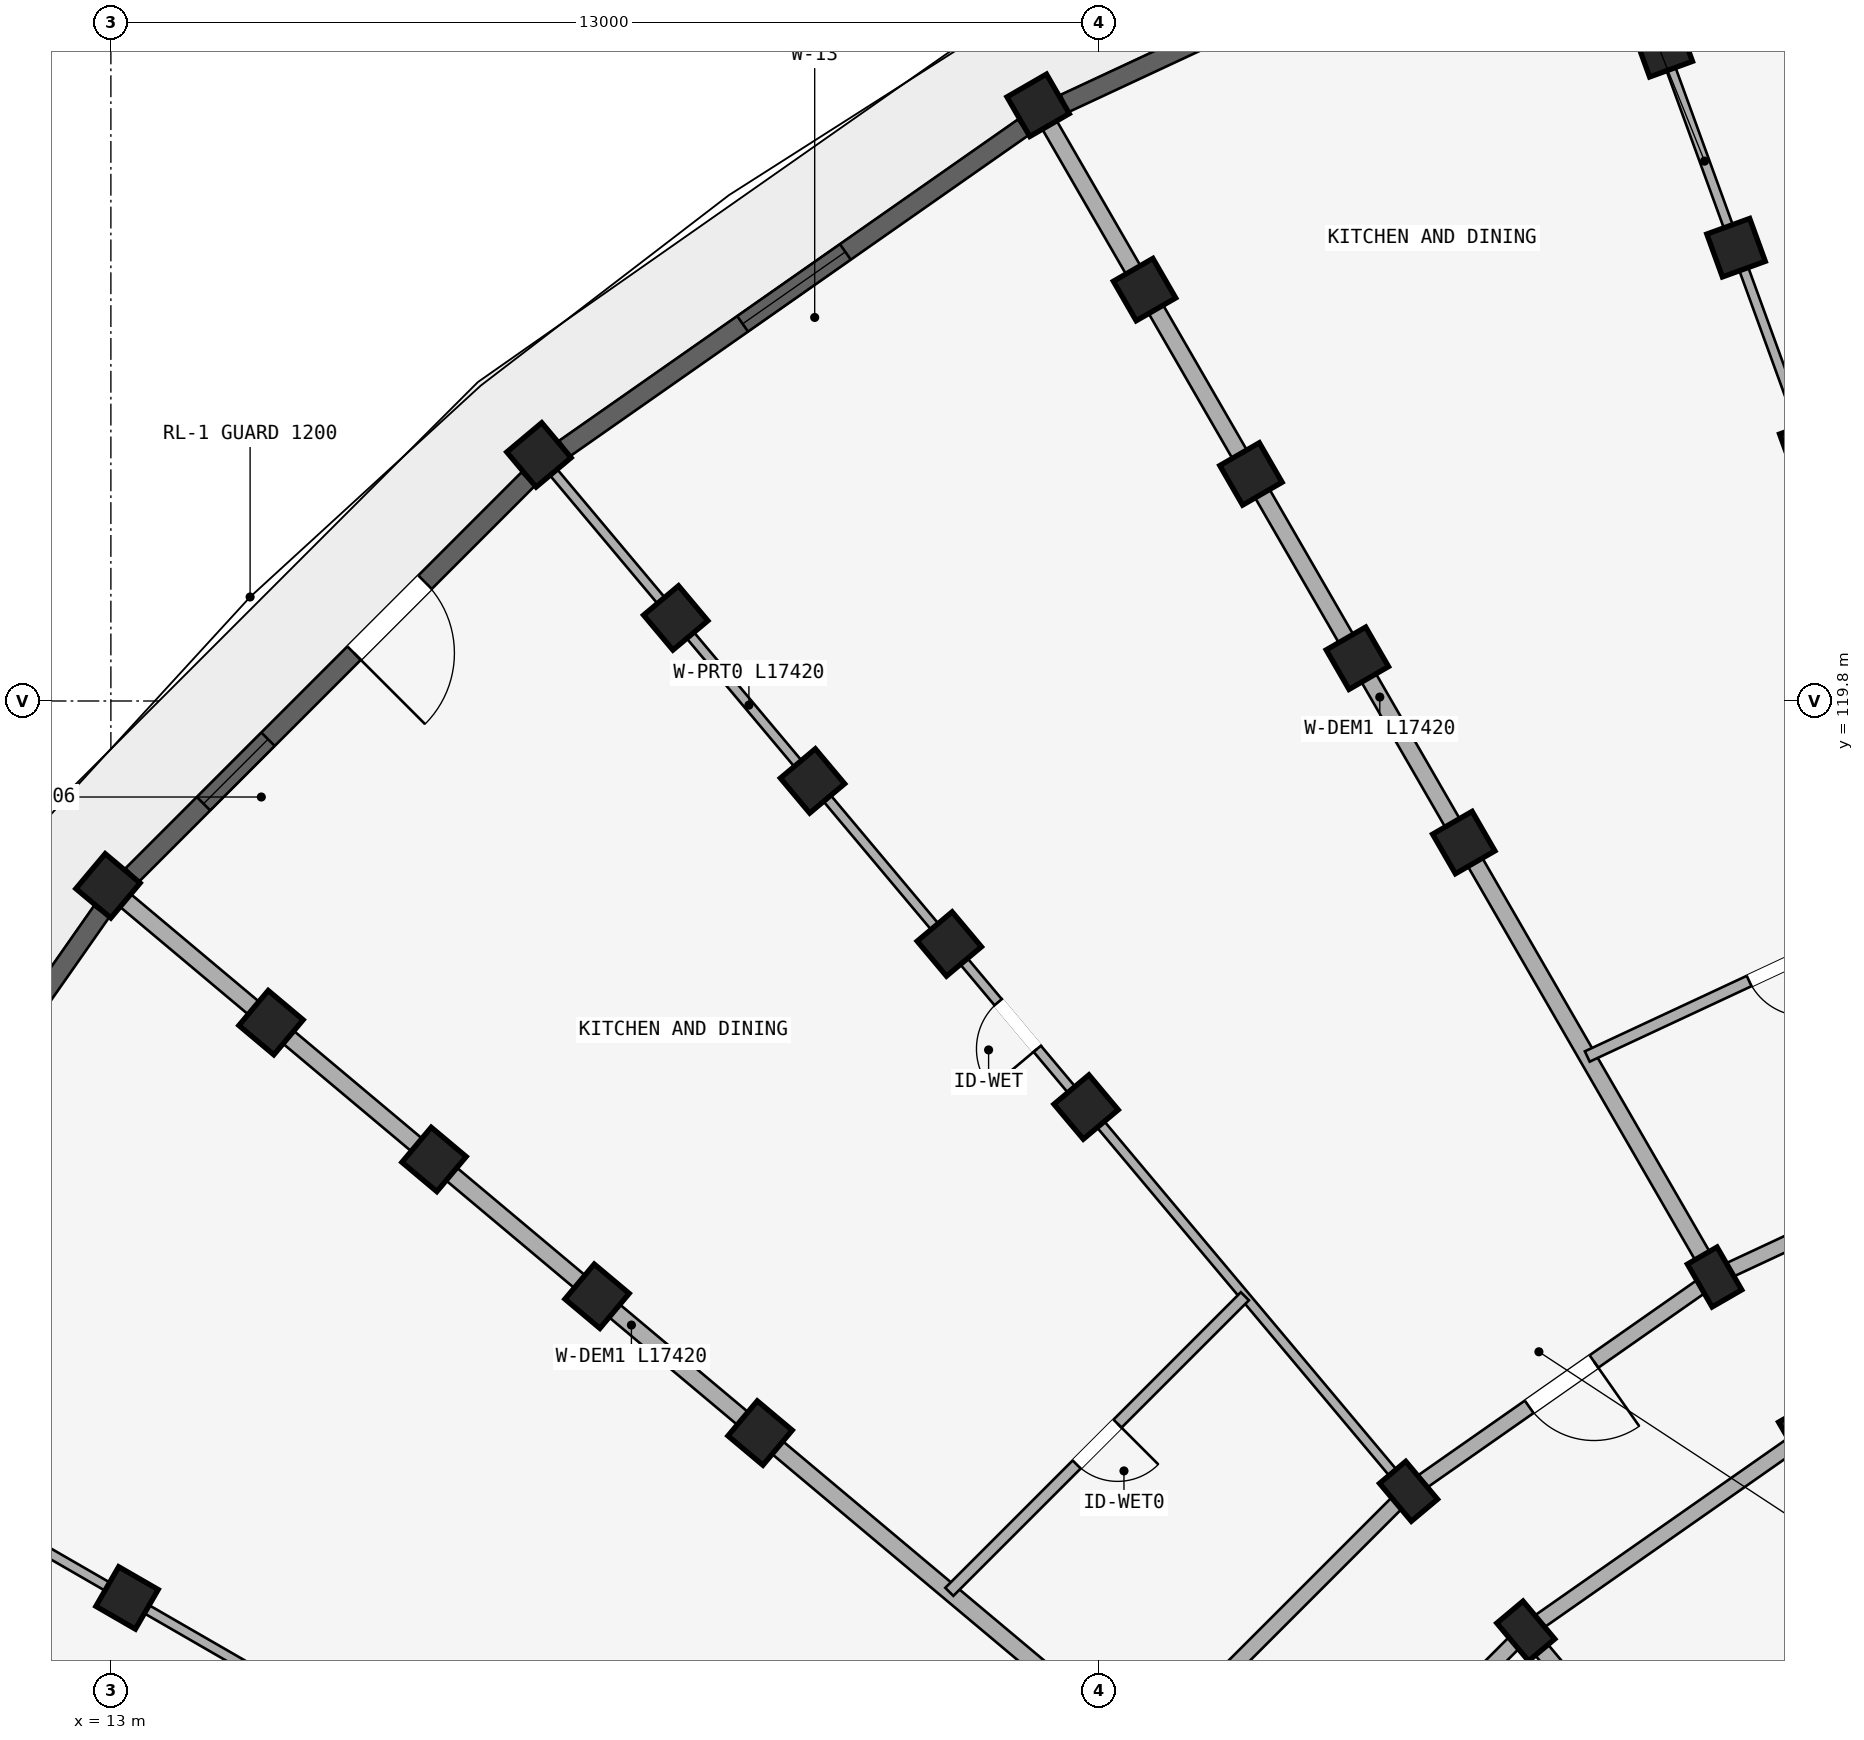
"""IFC4 building model, lengths in metres.
Left out: names, types, materials, properties, quantities, classifications, styles, units other than length and angle.
Written with IfcOpenShell. Run it as: python <this file> out.ifc"""

import sys

from ifc_helpers import new_model, si_unit, direction, frame, frame_2d, origin, origin_2d, place, context, subcontext, project, spatial, rectangle, extrude, element, fill, save


model = new_model("IFC4")
c1 = context("Model", 3, precision=1e-05, world=origin(), true_north=direction((0.0, 1.0)))
c2 = subcontext(c1, "Body", "Model", "MODEL_VIEW")
j1 = project(units=[si_unit("LENGTHUNIT", "METRE"), si_unit("PLANEANGLEUNIT", "RADIAN")], contexts=[c1])
p1 = place(None, origin())
s1 = spatial("IfcSite", under=j1, at=p1, CompositionType="ELEMENT")
p2 = place(p1, origin())
s2 = spatial("IfcBuilding", under=s1, at=p2, CompositionType="ELEMENT")
p3 = place(p2, frame((0.0, 0.0, 33.9)))
s3 = spatial("IfcBuildingStorey", under=s2, at=p3, CompositionType="ELEMENT", Elevation=33.9)
for number, where, z_axis, x_axis in (
    (1, (35.34, 123.132, 0.0), (0.0, 0.0, 1.0), (0.94, 0.342, 0.0)),
    (2, (34.382, 125.764, 0.0), (0.0, 0.0, 1.0), (0.94, 0.342, 0.0)),
    (3, (33.425, 128.395, 0.0), (0.0, 0.0, 1.0), (0.94, 0.342, 0.0)),
):
    element("IfcColumn", number, at=place(p3, frame(where, z_axis=z_axis, x_axis=x_axis)), inside=s3, PredefinedType="COLUMN", context=c2, shape_type="SweptSolid", body=[
        extrude(rectangle(XDim=0.6, YDim=0.6, at=origin_2d()), origin(), (0.0, 0.0, 1.0), 2.93),
    ])
for number, where, z_axis, x_axis in (
    (4, (35.3, 110.144, 0.0), (0.0, 0.0, 1.0), (0.866, 0.5, 0.0)),
    (5, (34.1, 112.222, 0.0), (0.0, 0.0, 1.0), (0.866, 0.5, 0.0)),
):
    element("IfcColumn", number, at=place(p3, frame(where, z_axis=z_axis, x_axis=x_axis)), inside=s3, PredefinedType="COLUMN", context=c2, shape_type="SweptSolid", body=[
        extrude(rectangle(XDim=0.45, YDim=0.65, at=origin_2d()), origin(), (0.0, 0.0, 1.0), 2.93),
    ])
for number, where, z_axis, x_axis in (
    (6, (30.8, 117.938, 0.0), (0.0, 0.0, 1.0), (0.866, 0.5, 0.0)),
    (7, (29.4, 120.363, 0.0), (0.0, 0.0, 1.0), (0.866, 0.5, 0.0)),
    (8, (28.0, 122.787, 0.0), (0.0, 0.0, 1.0), (0.866, 0.5, 0.0)),
    (9, (26.6, 125.212, 0.0), (0.0, 0.0, 1.0), (0.866, 0.5, 0.0)),
    (10, (25.2, 127.637, 0.0), (0.0, 0.0, 1.0), (0.866, 0.5, 0.0)),
):
    element("IfcColumn", number, at=place(p3, frame(where, z_axis=z_axis, x_axis=x_axis)), inside=s3, PredefinedType="COLUMN", context=c2, shape_type="SweptSolid", body=[
        extrude(rectangle(XDim=0.6, YDim=0.6, at=origin_2d()), origin(), (0.0, 0.0, 1.0), 2.93),
    ])
for number, where, z_axis, x_axis in (
    (11, (31.616, 107.564, 0.0), (0.0, 0.0, 1.0), (0.766, 0.643, 0.0)),
    (12, (30.073, 109.402, 0.0), (0.0, 0.0, 1.0), (0.766, 0.643, 0.0)),
):
    element("IfcColumn", number, at=place(p3, frame(where, z_axis=z_axis, x_axis=x_axis)), inside=s3, PredefinedType="COLUMN", context=c2, shape_type="SweptSolid", body=[
        extrude(rectangle(XDim=0.45, YDim=0.65, at=origin_2d()), origin(), (0.0, 0.0, 1.0), 2.93),
    ])
for number, where, z_axis, x_axis in (
    (13, (25.831, 114.458, 0.0), (0.0, 0.0, 1.0), (0.766, 0.643, 0.0)),
    (14, (24.031, 116.603, 0.0), (0.0, 0.0, 1.0), (0.766, 0.643, 0.0)),
    (15, (22.231, 118.748, 0.0), (0.0, 0.0, 1.0), (0.766, 0.643, 0.0)),
    (16, (20.432, 120.893, 0.0), (0.0, 0.0, 1.0), (0.766, 0.643, 0.0)),
    (17, (18.632, 123.038, 0.0), (0.0, 0.0, 1.0), (0.766, 0.643, 0.0)),
    (18, (21.542, 110.169, 0.0), (0.0, 0.0, 1.0), (0.643, 0.766, 0.0)),
    (19, (19.397, 111.969, 0.0), (0.0, 0.0, 1.0), (0.643, 0.766, 0.0)),
    (20, (17.252, 113.769, 0.0), (0.0, 0.0, 1.0), (0.643, 0.766, 0.0)),
    (21, (15.107, 115.568, 0.0), (0.0, 0.0, 1.0), (0.643, 0.766, 0.0)),
    (22, (12.962, 117.368, 0.0), (0.0, 0.0, 1.0), (0.643, 0.766, 0.0)),
    (23, (13.213, 108.0, 0.0), (0.0, 0.0, 1.0), (0.5, 0.866, 0.0)),
):
    element("IfcColumn", number, at=place(p3, frame(where, z_axis=z_axis, x_axis=x_axis)), inside=s3, PredefinedType="COLUMN", context=c2, shape_type="SweptSolid", body=[
        extrude(rectangle(XDim=0.6, YDim=0.6, at=origin_2d()), origin(), (0.0, 0.0, 1.0), 2.93),
    ])
p4 = place(p3, frame((38.555, 114.299, 0.0), z_axis=(0.0, 0.0, 1.0), x_axis=(-0.906302381024, -0.422629854778, 0.0)))
e24 = element("IfcWall", 24, at=p4, inside=s3, PredefinedType="STANDARD", context=c2, shape_type="SweptSolid", body=[
    extrude(rectangle(XDim=4.915, YDim=0.2, at=frame_2d((2.458, 0.0))), origin(), (0.0, 0.0, 1.0), 2.372),
])
p5 = place(p3, frame((35.3, 110.144, 0.0), z_axis=(0.0, 0.0, 1.0), x_axis=(-0.819155404658, -0.573571637217, 0.0)))
e25 = element("IfcWall", 25, at=p5, inside=s3, PredefinedType="STANDARD", context=c2, shape_type="SweptSolid", body=[
    extrude(rectangle(XDim=4.497, YDim=0.2, at=frame_2d((2.249, 0.0))), origin(), (0.0, 0.0, 1.0), 2.372),
])
p6 = place(p3, frame((34.1, 112.222, 0.0), z_axis=(0.0, 0.0, 1.0), x_axis=(-0.819140911474, -0.573592335331, 0.0)))
e26 = element("IfcWall", 26, at=p6, inside=s3, PredefinedType="STANDARD", context=c2, shape_type="SweptSolid", body=[
    extrude(rectangle(XDim=4.916, YDim=0.2, at=frame_2d((2.458, 0.0))), origin(), (0.0, 0.0, 1.0), 2.372),
])
p7 = place(p6, frame((1.938, 0.0, 0.0)))
e27 = element("IfcOpeningElement", 27, at=p7, cuts=e26, PredefinedType="OPENING", context=c2, shape_type="SweptSolid", body=[
    extrude(rectangle(XDim=1.04, YDim=2.15, at=frame_2d((0.52, 1.075))), frame((0.0, 0.11, 0.0), z_axis=(0.0, -1.0, 0.0), x_axis=(1.0, 0.0, 0.0)), (0.0, 0.0, 1.0), 0.22),
])
p8 = place(p3, frame((31.616, 107.564, 0.0), z_axis=(0.0, 0.0, 1.0), x_axis=(-0.707106781187, -0.707106781187, 0.0)))
e28 = element("IfcWall", 28, at=p8, inside=s3, PredefinedType="STANDARD", context=c2, shape_type="SweptSolid", body=[
    extrude(rectangle(XDim=4.497, YDim=0.2, at=frame_2d((2.249, 0.0))), origin(), (0.0, 0.0, 1.0), 2.372),
])
p9 = place(p8, frame((1.749, 0.0, 0.0)))
e29 = element("IfcOpeningElement", 29, at=p9, cuts=e28, PredefinedType="OPENING", context=c2, shape_type="SweptSolid", body=[
    extrude(rectangle(XDim=1.0, YDim=2.15, at=frame_2d((0.5, 1.075))), frame((0.0, 0.11, 0.0), z_axis=(0.0, -1.0, 0.0), x_axis=(1.0, 0.0, 0.0)), (0.0, 0.0, 1.0), 0.22),
])
p10 = place(p3, frame((30.073, 109.402, 0.0), z_axis=(0.0, 0.0, 1.0), x_axis=(-0.707106781187, -0.707106781187, 0.0)))
e30 = element("IfcWall", 30, at=p10, inside=s3, PredefinedType="STANDARD", context=c2, shape_type="SweptSolid", body=[
    extrude(rectangle(XDim=4.916, YDim=0.2, at=frame_2d((2.458, 0.0))), origin(), (0.0, 0.0, 1.0), 2.372),
])
p11 = place(p3, frame((38.521, 114.393, 0.0), z_axis=(0.0, 0.0, 1.0), x_axis=(-0.342022120477, 0.939691901159, 0.0)))
e31 = element("IfcWall", 31, at=p11, inside=s3, PredefinedType="PARTITIONING", context=c2, shape_type="SweptSolid", body=[
    extrude(rectangle(XDim=17.42, YDim=0.125, at=frame_2d((8.71, 0.0))), origin(), (0.0, 0.0, 1.0), 2.372),
])
p12 = place(p11, frame((7.5, 0.0, 0.0)))
e32 = element("IfcOpeningElement", 32, at=p12, cuts=e31, PredefinedType="OPENING", context=c2, shape_type="SweptSolid", body=[
    extrude(rectangle(XDim=0.8, YDim=2.1, at=frame_2d((0.4, 1.05))), frame((0.0, 0.073, 0.0), z_axis=(0.0, -1.0, 0.0), x_axis=(1.0, 0.0, 0.0)), (0.0, 0.0, 1.0), 0.145),
])
p13 = place(p3, frame((34.05, 112.309, 0.0), z_axis=(0.0, 0.0, 1.0), x_axis=(-0.499997843263, 0.866026648973, 0.0)))
e33 = element("IfcWall", 33, at=p13, inside=s3, PredefinedType="STANDARD", context=c2, shape_type="SweptSolid", body=[
    extrude(rectangle(XDim=17.42, YDim=0.22, at=frame_2d((8.71, 0.0))), origin(), (0.0, 0.0, 1.0), 2.372),
])
p14 = place(p3, frame((35.987, 102.355, 0.0), z_axis=(0.0, 0.0, 1.0), x_axis=(-0.642784846501, 0.766046761698, 0.0)))
e34 = element("IfcWall", 34, at=p14, inside=s3, PredefinedType="STANDARD", context=c2, shape_type="SweptSolid", body=[
    extrude(rectangle(XDim=6.75, YDim=0.22, at=frame_2d((3.375, 0.0))), origin(), (0.0, 0.0, 1.0), 2.372),
])
p15 = place(p3, frame((30.009, 109.479, 0.0), z_axis=(0.0, 0.0, 1.0), x_axis=(-0.642784757967, 0.766046835987, 0.0)))
e35 = element("IfcWall", 35, at=p15, inside=s3, PredefinedType="PARTITIONING", context=c2, shape_type="SweptSolid", body=[
    extrude(rectangle(XDim=17.42, YDim=0.125, at=frame_2d((8.71, 0.0))), origin(), (0.0, 0.0, 1.0), 2.372),
])
p16 = place(p15, frame((7.5, 0.0, 0.0)))
e36 = element("IfcOpeningElement", 36, at=p16, cuts=e35, PredefinedType="OPENING", context=c2, shape_type="SweptSolid", body=[
    extrude(rectangle(XDim=0.8, YDim=2.1, at=frame_2d((0.4, 1.05))), frame((0.0, 0.073, 0.0), z_axis=(0.0, -1.0, 0.0), x_axis=(1.0, 0.0, 0.0)), (0.0, 0.0, 1.0), 0.145),
])
p17 = place(p3, frame((26.521, 105.991, 0.0), z_axis=(0.0, 0.0, 1.0), x_axis=(-0.766046835987, 0.642784757967, 0.0)))
e37 = element("IfcWall", 37, at=p17, inside=s3, PredefinedType="STANDARD", context=c2, shape_type="SweptSolid", body=[
    extrude(rectangle(XDim=17.42, YDim=0.22, at=frame_2d((8.71, 0.0))), origin(), (0.0, 0.0, 1.0), 2.372),
])
p18 = place(p3, frame((23.691, 101.95, 0.0), z_axis=(0.0, 0.0, 1.0), x_axis=(-0.866026648973, 0.499997843263, 0.0)))
e38 = element("IfcWall", 38, at=p18, inside=s3, PredefinedType="PARTITIONING", context=c2, shape_type="SweptSolid", body=[
    extrude(rectangle(XDim=17.42, YDim=0.125, at=frame_2d((8.71, 0.0))), origin(), (0.0, 0.0, 1.0), 2.372),
])
p19 = place(p18, frame((7.5, 0.0, 0.0)))
e39 = element("IfcOpeningElement", 39, at=p19, cuts=e38, PredefinedType="OPENING", context=c2, shape_type="SweptSolid", body=[
    extrude(rectangle(XDim=0.8, YDim=2.1, at=frame_2d((0.4, 1.05))), frame((0.0, 0.073, 0.0), z_axis=(0.0, -1.0, 0.0), x_axis=(1.0, 0.0, 0.0)), (0.0, 0.0, 1.0), 0.145),
])
p20 = place(p3, frame((37.409, 117.447, 0.0), z_axis=(0.0, 0.0, 1.0), x_axis=(-0.906302189986, -0.422630264446, 0.0)))
e40 = element("IfcWall", 40, at=p20, inside=s3, PredefinedType="PLUMBINGWALL", context=c2, shape_type="SweptSolid", body=[
    extrude(rectangle(XDim=5.5, YDim=0.15, at=frame_2d((2.75, 0.0))), origin(), (0.0, 0.0, 1.0), 2.372),
])
p21 = place(p20, frame((2.35, 0.0, 0.0)))
e41 = element("IfcOpeningElement", 41, at=p21, cuts=e40, PredefinedType="OPENING", context=c2, shape_type="SweptSolid", body=[
    extrude(rectangle(XDim=0.8, YDim=2.1, at=frame_2d((0.4, 1.05))), frame((0.0, 0.085, 0.0), z_axis=(0.0, -1.0, 0.0), x_axis=(1.0, 0.0, 0.0)), (0.0, 0.0, 1.0), 0.17),
])
p22 = place(p3, frame((27.92, 111.969, 0.0), z_axis=(0.0, 0.0, 1.0), x_axis=(-0.707106781187, -0.707106781187, 0.0)))
e42 = element("IfcWall", 42, at=p22, inside=s3, PredefinedType="PLUMBINGWALL", context=c2, shape_type="SweptSolid", body=[
    extrude(rectangle(XDim=5.5, YDim=0.15, at=frame_2d((2.75, 0.0))), origin(), (0.0, 0.0, 1.0), 2.372),
])
p23 = place(p22, frame((2.37, 0.0, 0.0)))
e43 = element("IfcOpeningElement", 43, at=p23, cuts=e42, PredefinedType="OPENING", context=c2, shape_type="SweptSolid", body=[
    extrude(rectangle(XDim=0.76, YDim=2.05, at=frame_2d((0.38, 1.025))), frame((0.0, 0.085, 0.0), z_axis=(0.0, -1.0, 0.0), x_axis=(1.0, 0.0, 0.0)), (0.0, 0.0, 1.0), 0.17),
])
p24 = place(p3, frame((32.225, 130.775, 0.0), z_axis=(0.0, 0.0, 1.0), x_axis=(-0.906321090675, -0.422589730823, 0.0)))
e44 = element("IfcWall", 44, at=p24, inside=s3, PredefinedType="STANDARD", context=c2, shape_type="SweptSolid", body=[
    extrude(rectangle(XDim=7.367, YDim=0.25, at=frame_2d((3.684, 0.0))), origin(), (0.0, 0.0, 1.0), 2.472),
])
p25 = place(p24, frame((2.783, 0.0, 0.622)))
e45 = element("IfcOpeningElement", 45, at=p25, cuts=e44, PredefinedType="OPENING", context=c2, shape_type="SweptSolid", body=[
    extrude(rectangle(XDim=1.8, YDim=1.65, at=frame_2d((0.9, 0.825))), frame((0.0, 0.135, 0.0), z_axis=(0.0, -1.0, 0.0), x_axis=(1.0, 0.0, 0.0)), (0.0, 0.0, 1.0), 0.27),
])
p26 = place(p3, frame((25.005, 127.348, 0.0), z_axis=(0.0, 0.0, 1.0), x_axis=(-0.819147839112, -0.573582441919, 0.0)))
e46 = element("IfcWall", 46, at=p26, inside=s3, PredefinedType="STANDARD", context=c2, shape_type="SweptSolid", body=[
    extrude(rectangle(XDim=7.367, YDim=0.25, at=frame_2d((3.684, 0.0))), origin(), (0.0, 0.0, 1.0), 2.472),
])
p27 = place(p26, frame((2.858, 0.0, 0.522)))
e47 = element("IfcOpeningElement", 47, at=p27, cuts=e46, PredefinedType="OPENING", context=c2, shape_type="SweptSolid", body=[
    extrude(rectangle(XDim=1.65, YDim=1.75, at=frame_2d((0.825, 0.875))), frame((0.0, 0.135, 0.0), z_axis=(0.0, -1.0, 0.0), x_axis=(1.0, 0.0, 0.0)), (0.0, 0.0, 1.0), 0.27),
])
p28 = place(p3, frame((18.49, 122.719, 0.0), z_axis=(0.0, 0.0, 1.0), x_axis=(-0.707106781187, -0.707106781187, 0.0)))
e48 = element("IfcWall", 48, at=p28, inside=s3, PredefinedType="STANDARD", context=c2, shape_type="SweptSolid", body=[
    extrude(rectangle(XDim=7.367, YDim=0.25, at=frame_2d((3.684, 0.0))), origin(), (0.0, 0.0, 1.0), 2.472),
])
p29 = place(p28, frame((4.84, 0.0, 0.322)))
e49 = element("IfcOpeningElement", 49, at=p29, cuts=e48, PredefinedType="OPENING", context=c2, shape_type="SweptSolid", body=[
    extrude(rectangle(XDim=1.2, YDim=1.5, at=frame_2d((0.6, 0.75))), frame((0.0, 0.135, 0.0), z_axis=(0.0, -1.0, 0.0), x_axis=(1.0, 0.0, 0.0)), (0.0, 0.0, 1.0), 0.27),
])
p30 = place(p28, frame((1.918, 0.0, 0.0)))
e50 = element("IfcOpeningElement", 50, at=p30, cuts=e48, PredefinedType="OPENING", context=c2, shape_type="SweptSolid", body=[
    extrude(rectangle(XDim=1.32, YDim=2.15, at=frame_2d((0.66, 1.075))), frame((0.0, 0.135, 0.0), z_axis=(0.0, -1.0, 0.0), x_axis=(1.0, 0.0, 0.0)), (0.0, 0.0, 1.0), 0.27),
])
p31 = place(p3, frame((12.878, 117.03, 0.0), z_axis=(0.0, 0.0, 1.0), x_axis=(-0.573582441919, -0.819147839112, 0.0)))
e51 = element("IfcWall", 51, at=p31, inside=s3, PredefinedType="STANDARD", context=c2, shape_type="SweptSolid", body=[
    extrude(rectangle(XDim=7.367, YDim=0.25, at=frame_2d((3.684, 0.0))), origin(), (0.0, 0.0, 1.0), 2.472),
])
p32 = place(p31, frame((2.634, 0.0, 0.472)))
e52 = element("IfcOpeningElement", 52, at=p32, cuts=e51, PredefinedType="OPENING", context=c2, shape_type="SweptSolid", body=[
    extrude(rectangle(XDim=2.1, YDim=1.8, at=frame_2d((1.05, 0.9))), frame((0.0, 0.135, 0.0), z_axis=(0.0, -1.0, 0.0), x_axis=(1.0, 0.0, 0.0)), (0.0, 0.0, 1.0), 0.27),
])
p33 = place(p27, origin())
e53 = element("IfcWindow", 53, at=p33, inside=s3, PartitioningType="DOUBLE_PANEL_VERTICAL", PredefinedType="WINDOW", context=c2, shape_type="SweptSolid", body=[
    extrude(rectangle(XDim=1.65, YDim=1.75, at=frame_2d((0.825, 0.875))), frame((0.0, 0.03, 0.0), z_axis=(0.0, -1.0, 0.0), x_axis=(1.0, 0.0, 0.0)), (0.0, 0.0, 1.0), 0.06),
])
fill(e47, e53)
p34 = place(p29, origin())
e54 = element("IfcWindow", 54, at=p34, inside=s3, PartitioningType="SINGLE_PANEL", PredefinedType="WINDOW", context=c2, shape_type="SweptSolid", body=[
    extrude(rectangle(XDim=1.2, YDim=1.5, at=frame_2d((0.6, 0.75))), frame((0.0, 0.03, 0.0), z_axis=(0.0, -1.0, 0.0), x_axis=(1.0, 0.0, 0.0)), (0.0, 0.0, 1.0), 0.06),
])
fill(e49, e54)
p35 = place(p16, frame((0.8, 0.0, 0.0), z_axis=(0.0, 0.0, 1.0), x_axis=(-1.0, 0.0, 0.0)))
e55 = element("IfcDoor", 55, at=p35, inside=s3, OperationType="SINGLE_SWING_RIGHT", PredefinedType="DOOR", context=c2, shape_type="SweptSolid", body=[
    extrude(rectangle(XDim=0.8, YDim=2.1, at=frame_2d((0.4, 1.05))), frame((0.0, 0.025, 0.0), z_axis=(0.0, -1.0, 0.0), x_axis=(1.0, 0.0, 0.0)), (0.0, 0.0, 1.0), 0.05),
])
fill(e36, e55)
p36 = place(p21, frame((0.8, 0.0, 0.0), z_axis=(0.0, 0.0, 1.0), x_axis=(-1.0, 0.0, 0.0)))
e56 = element("IfcDoor", 56, at=p36, inside=s3, OperationType="SINGLE_SWING_RIGHT", PredefinedType="DOOR", context=c2, shape_type="SweptSolid", body=[
    extrude(rectangle(XDim=0.8, YDim=2.1, at=frame_2d((0.4, 1.05))), frame((0.0, 0.025, 0.0), z_axis=(0.0, -1.0, 0.0), x_axis=(1.0, 0.0, 0.0)), (0.0, 0.0, 1.0), 0.05),
])
fill(e41, e56)
p37 = place(p7, origin())
e57 = element("IfcDoor", 57, at=p37, inside=s3, OperationType="SINGLE_SWING_LEFT", PredefinedType="DOOR", context=c2, shape_type="SweptSolid", body=[
    extrude(rectangle(XDim=1.04, YDim=2.15, at=frame_2d((0.52, 1.075))), frame((0.0, 0.025, 0.0), z_axis=(0.0, -1.0, 0.0), x_axis=(1.0, 0.0, 0.0)), (0.0, 0.0, 1.0), 0.05),
])
fill(e27, e57)
p38 = place(p23, frame((0.76, 0.0, 0.0), z_axis=(0.0, 0.0, 1.0), x_axis=(-1.0, 0.0, 0.0)))
e58 = element("IfcDoor", 58, at=p38, inside=s3, OperationType="SINGLE_SWING_RIGHT", PredefinedType="DOOR", context=c2, shape_type="SweptSolid", body=[
    extrude(rectangle(XDim=0.76, YDim=2.05, at=frame_2d((0.38, 1.025))), frame((0.0, 0.025, 0.0), z_axis=(0.0, -1.0, 0.0), x_axis=(1.0, 0.0, 0.0)), (0.0, 0.0, 1.0), 0.05),
])
fill(e43, e58)
p39 = place(p30, frame((1.32, 0.0, 0.0), z_axis=(0.0, 0.0, 1.0), x_axis=(-1.0, 0.0, 0.0)))
e59 = element("IfcDoor", 59, at=p39, inside=s3, OperationType="SINGLE_SWING_LEFT", PredefinedType="DOOR", context=c2, shape_type="SweptSolid", body=[
    extrude(rectangle(XDim=1.32, YDim=2.15, at=frame_2d((0.66, 1.075))), frame((0.0, 0.025, 0.0), z_axis=(0.0, -1.0, 0.0), x_axis=(1.0, 0.0, 0.0)), (0.0, 0.0, 1.0), 0.05),
])
fill(e50, e59)
save(model, sys.argv[1])
